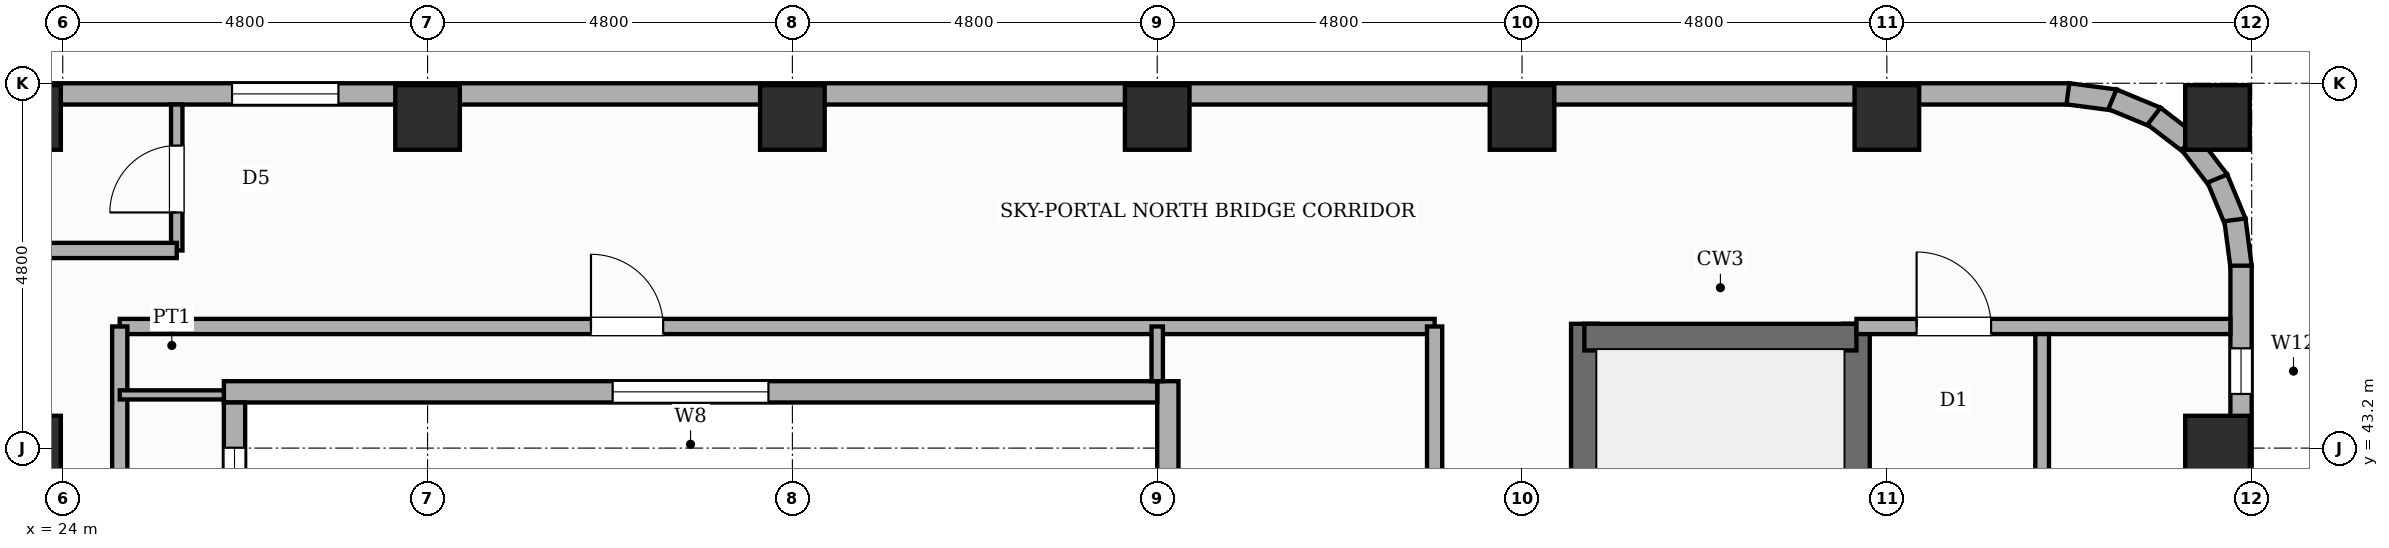
"""IFC4 building model, lengths in metres.
Left out: names, types, materials, properties, quantities, classifications, styles, units other than length and angle.
Written with IfcOpenShell. Run it as: python <this file> out.ifc"""

import sys

from ifc_helpers import new_model, si_unit, direction, frame, frame_2d, origin, origin_2d, place, context, subcontext, project, spatial, rectangle, extrude, element, fill, save


model = new_model("IFC4")
c1 = context("Model", 3, precision=1e-05, world=origin(), true_north=direction((0.0, 1.0)))
c2 = subcontext(c1, "Body", "Model", "MODEL_VIEW")
j1 = project(units=[si_unit("LENGTHUNIT", "METRE"), si_unit("PLANEANGLEUNIT", "RADIAN")], contexts=[c1])
p1 = place(None, origin())
s1 = spatial("IfcSite", under=j1, at=p1, CompositionType="ELEMENT")
p2 = place(p1, origin())
s2 = spatial("IfcBuilding", under=s1, at=p2, CompositionType="ELEMENT")
p3 = place(p2, frame((0.0, 0.0, 203.8)))
s3 = spatial("IfcBuildingStorey", under=s2, at=p3, CompositionType="ELEMENT", Elevation=203.8)
p4 = place(p3, frame((44.02, 35.865, 0.0), z_axis=(0.0, 0.0, 1.0), x_axis=(0.0, 1.0, 0.0)))
e1 = element("IfcWall", 1, at=p4, inside=s3, PredefinedType="SHEAR", context=c2, shape_type="SweptSolid", body=[
    extrude(rectangle(XDim=8.97, YDim=0.35, at=frame_2d((4.485, 0.0))), origin(), (0.0, 0.0, 1.0), 3.6),
])
p5 = place(p4, frame((0.65, 0.0, 0.0)))
e2 = element("IfcOpeningElement", 2, at=p5, cuts=e1, PredefinedType="OPENING", context=c2, shape_type="SweptSolid", body=[
    extrude(rectangle(XDim=0.95, YDim=2.1, at=frame_2d((0.475, 1.05))), frame((0.0, 0.185, 0.0), z_axis=(0.0, -1.0, 0.0), x_axis=(1.0, 0.0, 0.0)), (0.0, 0.0, 1.0), 0.37),
])
p6 = place(p3, frame((47.6, 35.865, 0.0), z_axis=(0.0, 0.0, 1.0), x_axis=(0.0, 1.0, 0.0)))
e3 = element("IfcWall", 3, at=p6, inside=s3, PredefinedType="SHEAR", context=c2, shape_type="SweptSolid", body=[
    extrude(rectangle(XDim=8.97, YDim=0.35, at=frame_2d((4.485, 0.0))), origin(), (0.0, 0.0, 1.0), 3.6),
])
p7 = place(p3, frame((44.02, 44.66, 0.0), z_axis=(0.0, 0.0, 1.0), x_axis=(1.0, 0.0, 0.0)))
e4 = element("IfcWall", 4, at=p7, inside=s3, PredefinedType="SHEAR", context=c2, shape_type="SweptSolid", body=[
    extrude(rectangle(XDim=3.58, YDim=0.35, at=frame_2d((1.79, 0.0))), origin(), (0.0, 0.0, 1.0), 3.6),
])
for number, where, z_axis, x_axis in (
    (5, (23.55, 43.2, 0.0), (0.0, 0.0, 1.0), (1.0, 0.0, 0.0)),
    (6, (23.55, 47.55, 0.0), (0.0, 0.0, 1.0), (1.0, 0.0, 0.0)),
    (7, (28.8, 47.55, 0.0), (0.0, 0.0, 1.0), (1.0, 0.0, 0.0)),
    (8, (33.6, 47.55, 0.0), (0.0, 0.0, 1.0), (1.0, 0.0, 0.0)),
    (9, (38.4, 47.55, 0.0), (0.0, 0.0, 1.0), (1.0, 0.0, 0.0)),
    (10, (43.2, 47.55, 0.0), (0.0, 0.0, 1.0), (1.0, 0.0, 0.0)),
    (11, (48.0, 47.55, 0.0), (0.0, 0.0, 1.0), (1.0, 0.0, 0.0)),
    (12, (52.35, 43.2, 0.0), (0.0, 0.0, 1.0), (1.0, 0.0, 0.0)),
    (13, (52.35, 47.55, 0.0), (0.0, 0.0, 1.0), (1.0, 0.0, 0.0)),
):
    element("IfcColumn", number, at=place(p3, frame(where, z_axis=z_axis, x_axis=x_axis)), inside=s3, PredefinedType="COLUMN", context=c2, shape_type="SweptSolid", body=[
        extrude(rectangle(XDim=0.85, YDim=0.85, at=origin_2d()), origin(), (0.0, 0.0, 1.0), 3.6),
    ])
p8 = place(p3, frame((7.2, 47.86, 0.0), z_axis=(0.0, 0.0, 1.0), x_axis=(1.0, 0.0, 0.0)))
e14 = element("IfcWall", 14, at=p8, inside=s3, PredefinedType="STANDARD", context=c2, shape_type="SweptSolid", body=[
    extrude(rectangle(XDim=43.2, YDim=0.28, at=frame_2d((21.6, 0.0))), origin(), (0.0, 0.0, 1.0), 2.66),
])
p9 = place(p8, frame((19.028, 0.0, 0.65)))
e15 = element("IfcOpeningElement", 15, at=p9, cuts=e14, PredefinedType="OPENING", context=c2, shape_type="SweptSolid", body=[
    extrude(rectangle(XDim=1.4, YDim=1.1, at=frame_2d((0.7, 0.55))), frame((0.0, 0.15, 0.0), z_axis=(0.0, -1.0, 0.0), x_axis=(1.0, 0.0, 0.0)), (0.0, 0.0, 1.0), 0.3),
])
p10 = place(p8, frame((0.308, 0.0, 0.65)))
e16 = element("IfcOpeningElement", 16, at=p10, cuts=e14, PredefinedType="OPENING", context=c2, shape_type="SweptSolid", body=[
    extrude(rectangle(XDim=1.4, YDim=1.1, at=frame_2d((0.7, 0.55))), frame((0.0, 0.15, 0.0), z_axis=(0.0, -1.0, 0.0), x_axis=(1.0, 0.0, 0.0)), (0.0, 0.0, 1.0), 0.3),
])
p11 = place(p8, frame((10.278, 0.0, 0.45)))
e17 = element("IfcOpeningElement", 17, at=p11, cuts=e14, PredefinedType="OPENING", context=c2, shape_type="SweptSolid", body=[
    extrude(rectangle(XDim=0.95, YDim=1.8, at=frame_2d((0.475, 0.9))), frame((0.0, 0.15, 0.0), z_axis=(0.0, -1.0, 0.0), x_axis=(1.0, 0.0, 0.0)), (0.0, 0.0, 1.0), 0.3),
])
p12 = place(p3, frame((50.382, 47.861, 0.0), z_axis=(0.0, 0.0, 1.0), x_axis=(0.991447664465, -0.130504898859, 0.0)))
e18 = element("IfcWall", 18, at=p12, inside=s3, PredefinedType="STANDARD", context=c2, shape_type="SweptSolid", body=[
    extrude(rectangle(XDim=0.627, YDim=0.28, at=frame_2d((0.313, 0.0))), origin(), (0.0, 0.0, 1.0), 2.66),
])
for number, where, z_axis, x_axis in (
    (19, (50.968, 47.789, 0.0), (0.0, 0.0, 1.0), (0.924, -0.382, 0.0)),
    (20, (51.515, 47.567, 0.0), (0.0, 0.0, 1.0), (0.793, -0.609, 0.0)),
    (21, (51.986, 47.212, 0.0), (0.0, 0.0, 1.0), (0.609, -0.793, 0.0)),
    (22, (52.349, 46.746, 0.0), (0.0, 0.0, 1.0), (0.383, -0.924, 0.0)),
    (23, (52.579, 46.203, 0.0), (0.0, 0.0, 1.0), (0.131, -0.991, 0.0)),
):
    element("IfcWall", number, at=place(p3, frame(where, z_axis=z_axis, x_axis=x_axis)), inside=s3, PredefinedType="STANDARD", context=c2, shape_type="SweptSolid", body=[
        extrude(rectangle(XDim=0.626, YDim=0.28, at=frame_2d((0.313, 0.0))), origin(), (0.0, 0.0, 1.0), 2.66),
    ])
p13 = place(p3, frame((52.66, 45.6, 0.0), z_axis=(0.0, 0.0, 1.0), x_axis=(0.0, -1.0, 0.0)))
e24 = element("IfcWall", 24, at=p13, inside=s3, PredefinedType="STANDARD", context=c2, shape_type="SweptSolid", body=[
    extrude(rectangle(XDim=14.4, YDim=0.28, at=frame_2d((7.2, 0.0))), origin(), (0.0, 0.0, 1.0), 2.66),
])
p14 = place(p13, frame((10.544, 0.0, 0.45)))
e25 = element("IfcOpeningElement", 25, at=p14, cuts=e24, PredefinedType="OPENING", context=c2, shape_type="SweptSolid", body=[
    extrude(rectangle(XDim=0.75, YDim=1.8, at=frame_2d((0.375, 0.9))), frame((0.0, 0.15, 0.0), z_axis=(0.0, -1.0, 0.0), x_axis=(1.0, 0.0, 0.0)), (0.0, 0.0, 1.0), 0.3),
])
p15 = place(p13, frame((1.087, 0.0, 0.45)))
e26 = element("IfcOpeningElement", 26, at=p15, cuts=e24, PredefinedType="OPENING", context=c2, shape_type="SweptSolid", body=[
    extrude(rectangle(XDim=0.6, YDim=1.8, at=frame_2d((0.3, 0.9))), frame((0.0, 0.15, 0.0), z_axis=(0.0, -1.0, 0.0), x_axis=(1.0, 0.0, 0.0)), (0.0, 0.0, 1.0), 0.3),
])
p16 = place(p13, frame((5.511, 0.0, 0.45)))
e27 = element("IfcOpeningElement", 27, at=p16, cuts=e24, PredefinedType="OPENING", context=c2, shape_type="SweptSolid", body=[
    extrude(rectangle(XDim=0.95, YDim=1.8, at=frame_2d((0.475, 0.9))), frame((0.0, 0.15, 0.0), z_axis=(0.0, -1.0, 0.0), x_axis=(1.0, 0.0, 0.0)), (0.0, 0.0, 1.0), 0.3),
])
p17 = place(p3, frame((38.54, 28.8, 0.0), z_axis=(0.0, 0.0, 1.0), x_axis=(0.0, 1.0, 0.0)))
e28 = element("IfcWall", 28, at=p17, inside=s3, PredefinedType="STANDARD", context=c2, shape_type="SweptSolid", body=[
    extrude(rectangle(XDim=15.28, YDim=0.28, at=frame_2d((7.64, 0.0))), origin(), (0.0, 0.0, 1.0), 3.38),
])
p18 = place(p17, frame((7.13, 0.0, 0.8)))
e29 = element("IfcOpeningElement", 29, at=p18, cuts=e28, PredefinedType="OPENING", context=c2, shape_type="SweptSolid", body=[
    extrude(rectangle(XDim=2.05, YDim=1.95, at=frame_2d((1.025, 0.975))), frame((0.0, 0.15, 0.0), z_axis=(0.0, -1.0, 0.0), x_axis=(1.0, 0.0, 0.0)), (0.0, 0.0, 1.0), 0.3),
])
p19 = place(p3, frame((38.4, 43.94, 0.0), z_axis=(0.0, 0.0, 1.0), x_axis=(-1.0, 0.0, 0.0)))
e30 = element("IfcWall", 30, at=p19, inside=s3, PredefinedType="STANDARD", context=c2, shape_type="SweptSolid", body=[
    extrude(rectangle(XDim=12.28, YDim=0.28, at=frame_2d((6.14, 0.0))), origin(), (0.0, 0.0, 1.0), 3.38),
])
p20 = place(p19, frame((5.115, 0.0, 0.8)))
e31 = element("IfcOpeningElement", 31, at=p20, cuts=e30, PredefinedType="OPENING", context=c2, shape_type="SweptSolid", body=[
    extrude(rectangle(XDim=2.05, YDim=1.95, at=frame_2d((1.025, 0.975))), frame((0.0, 0.15, 0.0), z_axis=(0.0, -1.0, 0.0), x_axis=(1.0, 0.0, 0.0)), (0.0, 0.0, 1.0), 0.3),
])
p21 = place(p3, frame((26.26, 43.8, 0.0), z_axis=(0.0, 0.0, 1.0), x_axis=(0.0, -1.0, 0.0)))
e32 = element("IfcWall", 32, at=p21, inside=s3, PredefinedType="STANDARD", context=c2, shape_type="SweptSolid", body=[
    extrude(rectangle(XDim=15.0, YDim=0.28, at=frame_2d((7.5, 0.0))), origin(), (0.0, 0.0, 1.0), 3.38),
])
p22 = place(p21, frame((10.59, 0.0, 0.8)))
e33 = element("IfcOpeningElement", 33, at=p22, cuts=e32, PredefinedType="OPENING", context=c2, shape_type="SweptSolid", body=[
    extrude(rectangle(XDim=2.05, YDim=1.95, at=frame_2d((1.025, 0.975))), frame((0.0, 0.15, 0.0), z_axis=(0.0, -1.0, 0.0), x_axis=(1.0, 0.0, 0.0)), (0.0, 0.0, 1.0), 0.3),
])
p23 = place(p21, frame((5.245, 0.0, 0.8)))
e34 = element("IfcOpeningElement", 34, at=p23, cuts=e32, PredefinedType="OPENING", context=c2, shape_type="SweptSolid", body=[
    extrude(rectangle(XDim=2.05, YDim=1.95, at=frame_2d((1.025, 0.975))), frame((0.0, 0.15, 0.0), z_axis=(0.0, -1.0, 0.0), x_axis=(1.0, 0.0, 0.0)), (0.0, 0.0, 1.0), 0.3),
])
p24 = place(p21, frame((0.595, 0.0, 0.8)))
e35 = element("IfcOpeningElement", 35, at=p24, cuts=e32, PredefinedType="OPENING", context=c2, shape_type="SweptSolid", body=[
    extrude(rectangle(XDim=2.05, YDim=1.95, at=frame_2d((1.025, 0.975))), frame((0.0, 0.15, 0.0), z_axis=(0.0, -1.0, 0.0), x_axis=(1.0, 0.0, 0.0)), (0.0, 0.0, 1.0), 0.3),
])
p25 = place(p3, frame((25.5, 45.8, 0.0), z_axis=(0.0, 0.0, 1.0), x_axis=(0.0, 1.0, 0.0)))
e36 = element("IfcWall", 36, at=p25, inside=s3, PredefinedType="PARTITIONING", context=c2, shape_type="SweptSolid", body=[
    extrude(rectangle(XDim=1.92, YDim=0.15, at=frame_2d((0.96, 0.0))), origin(), (0.0, 0.0, 1.0), 3.38),
])
p26 = place(p25, frame((0.5, 0.0, 0.0)))
e37 = element("IfcOpeningElement", 37, at=p26, cuts=e36, PredefinedType="OPENING", context=c2, shape_type="SweptSolid", body=[
    extrude(rectangle(XDim=0.88, YDim=2.1, at=frame_2d((0.44, 1.05))), frame((0.0, 0.085, 0.0), z_axis=(0.0, -1.0, 0.0), x_axis=(1.0, 0.0, 0.0)), (0.0, 0.0, 1.0), 0.17),
])
p27 = place(p3, frame((22.75, 45.8, 0.0), z_axis=(0.0, 0.0, 1.0), x_axis=(1.0, 0.0, 0.0)))
e38 = element("IfcWall", 38, at=p27, inside=s3, PredefinedType="PARTITIONING", context=c2, shape_type="SweptSolid", body=[
    extrude(rectangle(XDim=2.75, YDim=0.2, at=frame_2d((1.375, 0.0))), origin(), (0.0, 0.0, 1.0), 3.38),
])
p28 = place(p3, frame((24.75, 44.8, 0.0), z_axis=(0.0, 0.0, 1.0), x_axis=(1.0, 0.0, 0.0)))
e39 = element("IfcWall", 39, at=p28, inside=s3, PredefinedType="PARTITIONING", context=c2, shape_type="SweptSolid", body=[
    extrude(rectangle(XDim=17.3, YDim=0.2, at=frame_2d((8.65, 0.0))), origin(), (0.0, 0.0, 1.0), 3.38),
])
p29 = place(p28, frame((6.2, 0.0, 0.0)))
e40 = element("IfcOpeningElement", 40, at=p29, cuts=e39, PredefinedType="OPENING", context=c2, shape_type="SweptSolid", body=[
    extrude(rectangle(XDim=0.95, YDim=2.15, at=frame_2d((0.475, 1.075))), frame((0.0, 0.11, 0.0), z_axis=(0.0, -1.0, 0.0), x_axis=(1.0, 0.0, 0.0)), (0.0, 0.0, 1.0), 0.22),
])
p30 = place(p3, frame((38.4, 44.08, 0.0), z_axis=(0.0, 0.0, 1.0), x_axis=(0.0, 1.0, 0.0)))
e41 = element("IfcWall", 41, at=p30, inside=s3, PredefinedType="PARTITIONING", context=c2, shape_type="SweptSolid", body=[
    extrude(rectangle(XDim=0.72, YDim=0.15, at=frame_2d((0.36, 0.0))), origin(), (0.0, 0.0, 1.0), 3.38),
])
p31 = place(p3, frame((47.6, 44.8, 0.0), z_axis=(0.0, 0.0, 1.0), x_axis=(1.0, 0.0, 0.0)))
e42 = element("IfcWall", 42, at=p31, inside=s3, PredefinedType="PARTITIONING", context=c2, shape_type="SweptSolid", body=[
    extrude(rectangle(XDim=4.92, YDim=0.2, at=frame_2d((2.46, 0.0))), origin(), (0.0, 0.0, 1.0), 3.38),
])
p32 = place(p31, frame((0.792, 0.0, 0.0)))
e43 = element("IfcOpeningElement", 43, at=p32, cuts=e42, PredefinedType="OPENING", context=c2, shape_type="SweptSolid", body=[
    extrude(rectangle(XDim=0.98, YDim=2.18, at=frame_2d((0.49, 1.09))), frame((0.0, 0.11, 0.0), z_axis=(0.0, -1.0, 0.0), x_axis=(1.0, 0.0, 0.0)), (0.0, 0.0, 1.0), 0.22),
])
p33 = place(p3, frame((24.75, 40.6, 0.0), z_axis=(0.0, 0.0, 1.0), x_axis=(0.0, 1.0, 0.0)))
e44 = element("IfcWall", 44, at=p33, inside=s3, PredefinedType="PARTITIONING", context=c2, shape_type="SweptSolid", body=[
    extrude(rectangle(XDim=4.2, YDim=0.2, at=frame_2d((2.1, 0.0))), origin(), (0.0, 0.0, 1.0), 3.38),
])
p34 = place(p33, frame((1.0, 0.0, 0.0)))
e45 = element("IfcOpeningElement", 45, at=p34, cuts=e44, PredefinedType="OPENING", context=c2, shape_type="SweptSolid", body=[
    extrude(rectangle(XDim=0.86, YDim=2.1, at=frame_2d((0.43, 1.05))), frame((0.0, 0.11, 0.0), z_axis=(0.0, -1.0, 0.0), x_axis=(1.0, 0.0, 0.0)), (0.0, 0.0, 1.0), 0.22),
])
p35 = place(p3, frame((24.75, 43.9, 0.0), z_axis=(0.0, 0.0, 1.0), x_axis=(1.0, 0.0, 0.0)))
e46 = element("IfcWall", 46, at=p35, inside=s3, PredefinedType="PARTITIONING", context=c2, shape_type="SweptSolid", body=[
    extrude(rectangle(XDim=1.37, YDim=0.12, at=frame_2d((0.685, 0.0))), origin(), (0.0, 0.0, 1.0), 3.38),
])
p36 = place(p3, frame((42.05, 36.05, 0.0), z_axis=(0.0, 0.0, 1.0), x_axis=(0.0, 1.0, 0.0)))
e47 = element("IfcWall", 47, at=p36, inside=s3, PredefinedType="PARTITIONING", context=c2, shape_type="SweptSolid", body=[
    extrude(rectangle(XDim=8.75, YDim=0.2, at=frame_2d((4.375, 0.0))), origin(), (0.0, 0.0, 1.0), 3.38),
])
p37 = place(p36, frame((4.2, 0.0, 0.0)))
e48 = element("IfcOpeningElement", 48, at=p37, cuts=e47, PredefinedType="OPENING", context=c2, shape_type="SweptSolid", body=[
    extrude(rectangle(XDim=0.95, YDim=2.15, at=frame_2d((0.475, 1.075))), frame((0.0, 0.11, 0.0), z_axis=(0.0, -1.0, 0.0), x_axis=(1.0, 0.0, 0.0)), (0.0, 0.0, 1.0), 0.22),
])
p38 = place(p3, frame((50.043, 29.08, 0.0), z_axis=(0.0, 0.0, 1.0), x_axis=(0.0, 1.0, 0.0)))
e49 = element("IfcWall", 49, at=p38, inside=s3, PredefinedType="PLUMBINGWALL", context=c2, shape_type="SweptSolid", body=[
    extrude(rectangle(XDim=15.62, YDim=0.18, at=frame_2d((7.81, 0.0))), origin(), (0.0, 0.0, 1.0), 3.38),
])
p39 = place(p38, frame((2.223, 0.0, 0.0)))
e50 = element("IfcOpeningElement", 50, at=p39, cuts=e49, PredefinedType="OPENING", context=c2, shape_type="SweptSolid", body=[
    extrude(rectangle(XDim=0.9, YDim=2.15, at=frame_2d((0.45, 1.075))), frame((0.0, 0.1, 0.0), z_axis=(0.0, -1.0, 0.0), x_axis=(1.0, 0.0, 0.0)), (0.0, 0.0, 1.0), 0.2),
])
p40 = place(p38, frame((7.999, 0.0, 0.0)))
e51 = element("IfcOpeningElement", 51, at=p40, cuts=e49, PredefinedType="OPENING", context=c2, shape_type="SweptSolid", body=[
    extrude(rectangle(XDim=0.9, YDim=2.15, at=frame_2d((0.45, 1.075))), frame((0.0, 0.1, 0.0), z_axis=(0.0, -1.0, 0.0), x_axis=(1.0, 0.0, 0.0)), (0.0, 0.0, 1.0), 0.2),
])
p41 = place(p38, frame((12.75, 0.0, 0.0)))
e52 = element("IfcOpeningElement", 52, at=p41, cuts=e49, PredefinedType="OPENING", context=c2, shape_type="SweptSolid", body=[
    extrude(rectangle(XDim=0.86, YDim=2.1, at=frame_2d((0.43, 1.05))), frame((0.0, 0.1, 0.0), z_axis=(0.0, -1.0, 0.0), x_axis=(1.0, 0.0, 0.0)), (0.0, 0.0, 1.0), 0.2),
])
p42 = place(p9, origin())
e53 = element("IfcWindow", 53, at=p42, inside=s3, PartitioningType="SINGLE_PANEL", PredefinedType="WINDOW", context=c2, shape_type="SweptSolid", body=[
    extrude(rectangle(XDim=1.4, YDim=1.1, at=frame_2d((0.7, 0.55))), frame((0.0, 0.03, 0.0), z_axis=(0.0, -1.0, 0.0), x_axis=(1.0, 0.0, 0.0)), (0.0, 0.0, 1.0), 0.06),
])
fill(e15, e53)
p43 = place(p15, origin())
e54 = element("IfcWindow", 54, at=p43, inside=s3, PartitioningType="SINGLE_PANEL", PredefinedType="WINDOW", context=c2, shape_type="SweptSolid", body=[
    extrude(rectangle(XDim=0.6, YDim=1.8, at=frame_2d((0.3, 0.9))), frame((0.0, 0.03, 0.0), z_axis=(0.0, -1.0, 0.0), x_axis=(1.0, 0.0, 0.0)), (0.0, 0.0, 1.0), 0.06),
])
fill(e26, e54)
p44 = place(p20, origin())
e55 = element("IfcWindow", 55, at=p44, inside=s3, PartitioningType="SINGLE_PANEL", PredefinedType="WINDOW", context=c2, shape_type="SweptSolid", body=[
    extrude(rectangle(XDim=2.05, YDim=1.95, at=frame_2d((1.025, 0.975))), frame((0.0, 0.03, 0.0), z_axis=(0.0, -1.0, 0.0), x_axis=(1.0, 0.0, 0.0)), (0.0, 0.0, 1.0), 0.06),
])
fill(e31, e55)
p45 = place(p24, origin())
e56 = element("IfcWindow", 56, at=p45, inside=s3, PartitioningType="SINGLE_PANEL", PredefinedType="WINDOW", context=c2, shape_type="SweptSolid", body=[
    extrude(rectangle(XDim=2.05, YDim=1.95, at=frame_2d((1.025, 0.975))), frame((0.0, 0.03, 0.0), z_axis=(0.0, -1.0, 0.0), x_axis=(1.0, 0.0, 0.0)), (0.0, 0.0, 1.0), 0.06),
])
fill(e35, e56)
p46 = place(p26, origin())
e57 = element("IfcDoor", 57, at=p46, inside=s3, OperationType="SINGLE_SWING_LEFT", PredefinedType="DOOR", context=c2, shape_type="SweptSolid", body=[
    extrude(rectangle(XDim=0.88, YDim=2.1, at=frame_2d((0.44, 1.05))), frame((0.0, 0.025, 0.0), z_axis=(0.0, -1.0, 0.0), x_axis=(1.0, 0.0, 0.0)), (0.0, 0.0, 1.0), 0.05),
])
fill(e37, e57)
p47 = place(p29, origin())
e58 = element("IfcDoor", 58, at=p47, inside=s3, OperationType="SINGLE_SWING_LEFT", PredefinedType="DOOR", context=c2, shape_type="SweptSolid", body=[
    extrude(rectangle(XDim=0.95, YDim=2.15, at=frame_2d((0.475, 1.075))), frame((0.0, 0.025, 0.0), z_axis=(0.0, -1.0, 0.0), x_axis=(1.0, 0.0, 0.0)), (0.0, 0.0, 1.0), 0.05),
])
fill(e40, e58)
p48 = place(p32, origin())
e59 = element("IfcDoor", 59, at=p48, inside=s3, OperationType="SINGLE_SWING_LEFT", PredefinedType="DOOR", context=c2, shape_type="SweptSolid", body=[
    extrude(rectangle(XDim=0.98, YDim=2.18, at=frame_2d((0.49, 1.09))), frame((0.0, 0.025, 0.0), z_axis=(0.0, -1.0, 0.0), x_axis=(1.0, 0.0, 0.0)), (0.0, 0.0, 1.0), 0.05),
])
fill(e43, e59)
save(model, sys.argv[1])
